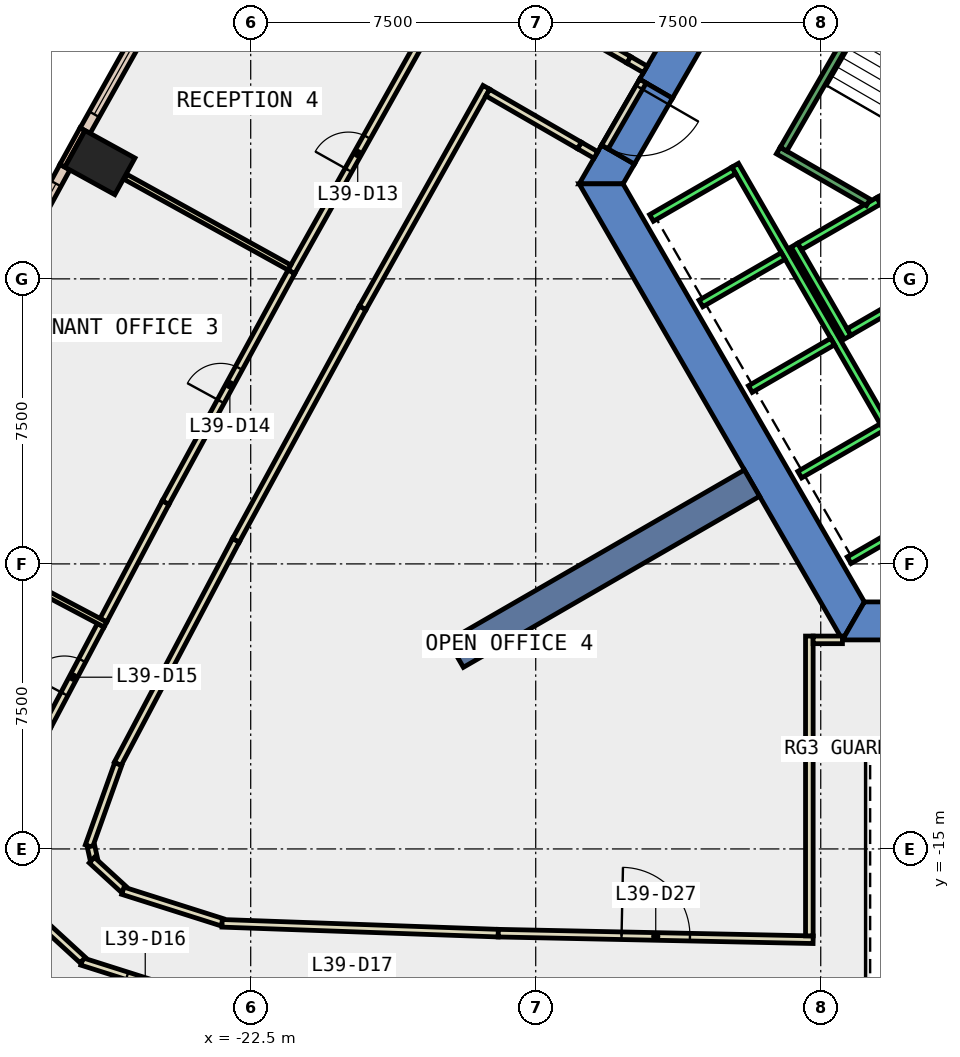
"""IFC4 building model, lengths in metres.
Left out: names, types, materials, properties, quantities, classifications, styles, units other than length and angle.
Written with IfcOpenShell. Run it as: python <this file> out.ifc"""

import sys

from ifc_helpers import new_model, si_unit, direction, frame, frame_2d, origin, origin_2d, place, context, subcontext, project, spatial, polyline, rectangle, outline, extrude, element, fill, save


model = new_model("IFC4")
c1 = context("Model", 3, precision=1e-05, world=origin(), true_north=direction((0.0, 1.0)))
c2 = subcontext(c1, "Body", "Model", "MODEL_VIEW")
j1 = project(units=[si_unit("LENGTHUNIT", "METRE"), si_unit("PLANEANGLEUNIT", "RADIAN")], contexts=[c1])
p1 = place(None, origin())
s1 = spatial("IfcSite", under=j1, at=p1, CompositionType="ELEMENT")
p2 = place(p1, origin())
s2 = spatial("IfcBuilding", under=s1, at=p2, CompositionType="ELEMENT")
p3 = place(p2, frame((0.0, 0.0, 176.0)))
s3 = spatial("IfcBuildingStorey", under=s2, at=p3, CompositionType="ELEMENT", Elevation=176.0)
p4 = place(p3, frame((-26.468, 3.059, -0.4), z_axis=(0.0, 0.0, 1.0), x_axis=(0.481983074142, 0.876180527198, 0.0)))
e1 = element("IfcColumn", 1, at=p4, inside=s3, PredefinedType="COLUMN", context=c2, shape_type="SweptSolid", body=[
    extrude(rectangle(XDim=1.1, YDim=1.5, at=origin_2d()), origin(), (0.0, 0.0, 1.0), 4.2),
])
p5 = place(p3, frame((0.0, 0.0, -0.4)))
e2 = element("IfcWall", 2, at=p5, inside=s3, PredefinedType="SHEAR", context=c2, shape_type="SweptSolid", body=[
    extrude(outline(polyline([(-12.267, 5.252), (-11.402, 4.752), (-6.351, 13.5), (-6.928, 14.5), (-12.267, 5.252)])), origin(), (0.0, 0.0, 1.0), 4.2),
])
p6 = place(p3, frame((0.0, 0.0, -0.4)))
e3 = element("IfcWall", 3, at=p6, inside=s3, PredefinedType="SHEAR", context=c2, shape_type="SweptSolid", body=[
    extrude(outline(polyline([(-12.402, 3.02), (-13.267, 3.52), (-13.856, 2.5), (-12.702, 2.5), (-12.402, 3.02)])), origin(), (0.0, 0.0, 1.0), 4.2),
])
p7 = place(p3, frame((0.0, 0.0, 3.6)))
e4 = element("IfcWall", 4, at=p7, inside=s3, PredefinedType="SHEAR", context=c2, shape_type="SweptSolid", body=[
    extrude(outline(polyline([(-13.267, 3.52), (-12.402, 3.02), (-11.402, 4.752), (-12.267, 5.252), (-13.267, 3.52)])), origin(), (0.0, 0.0, 1.0), 0.2),
])
p8 = place(p3, frame((0.0, 0.0, -0.4)))
e5 = element("IfcWall", 5, at=p8, inside=s3, PredefinedType="SHEAR", context=c2, shape_type="SweptSolid", body=[
    extrude(outline(polyline([(-13.856, 2.5), (-6.928, -9.5), (-6.351, -8.5), (-12.702, 2.5), (-13.856, 2.5)])), origin(), (0.0, 0.0, 1.0), 4.2),
])
p9 = place(p3, frame((0.0, 0.0, -0.4)))
e6 = element("IfcWall", 6, at=p9, inside=s3, PredefinedType="SHEAR", context=c2, shape_type="SweptSolid", body=[
    extrude(outline(polyline([(3.75, -9.5), (3.75, -8.5), (-6.351, -8.5), (-6.928, -9.5), (3.75, -9.5)])), origin(), (0.0, 0.0, 1.0), 4.2),
])
p10 = place(p3, frame((-9.31, -5.375, -0.4), z_axis=(0.0, 0.0, 1.0), x_axis=(-0.866017533419, -0.500013631625, 0.0)))
e7 = element("IfcWall", 7, at=p10, inside=s3, PredefinedType="SHEAR", context=c2, shape_type="SweptSolid", body=[
    extrude(rectangle(XDim=9.0, YDim=0.8, at=frame_2d((4.5, 0.0))), origin(), (0.0, 0.0, 1.0), 4.2),
])
p11 = place(p3, frame((-26.926, 3.939, 0.0), z_axis=(0.0, 0.0, 1.0), x_axis=(-0.481850587491, -0.876253394478, 0.0)))
e8 = element("IfcWall", 8, at=p11, inside=s3, PredefinedType="STANDARD", context=c2, shape_type="SweptSolid", body=[
    extrude(rectangle(XDim=1.1, YDim=0.15, at=frame_2d((0.55, 0.0))), origin(), (0.0, 0.0, 1.0), 3.8),
])
p12 = place(p3, frame((-23.936, 9.106, 0.0), z_axis=(0.0, 0.0, 1.0), x_axis=(-0.489305602904, -0.872112393541, 0.0)))
e9 = element("IfcWall", 9, at=p12, inside=s3, PredefinedType="STANDARD", context=c2, shape_type="SweptSolid", body=[
    extrude(rectangle(XDim=5.969, YDim=0.3, at=frame_2d((2.985, 0.0))), origin(), (0.0, 0.0, 1.0), 3.8),
])
p13 = place(p12, frame((0.492, 0.0, 0.9)))
e10 = element("IfcOpeningElement", 10, at=p13, cuts=e9, PredefinedType="OPENING", context=c2, shape_type="SweptSolid", body=[
    extrude(rectangle(XDim=2.0, YDim=2.6, at=frame_2d((1.0, 1.3))), frame((0.0, 0.16, 0.0), z_axis=(0.0, -1.0, 0.0), x_axis=(1.0, 0.0, 0.0)), (0.0, 0.0, 1.0), 0.32),
])
p14 = place(p12, frame((3.477, 0.0, 0.9)))
e11 = element("IfcOpeningElement", 11, at=p14, cuts=e9, PredefinedType="OPENING", context=c2, shape_type="SweptSolid", body=[
    extrude(rectangle(XDim=2.0, YDim=2.6, at=frame_2d((1.0, 1.3))), frame((0.0, 0.16, 0.0), z_axis=(0.0, -1.0, 0.0), x_axis=(1.0, 0.0, 0.0)), (0.0, 0.0, 1.0), 0.32),
])
p15 = place(p3, frame((-27.388, 2.939, 0.0), z_axis=(0.0, 0.0, 1.0), x_axis=(-0.478711740571, -0.877972134774, 0.0)))
e12 = element("IfcWall", 12, at=p15, inside=s3, PredefinedType="STANDARD", context=c2, shape_type="SweptSolid", body=[
    extrude(rectangle(XDim=5.97, YDim=0.3, at=frame_2d((2.985, 0.0))), origin(), (0.0, 0.0, 1.0), 3.8),
])
p16 = place(p15, frame((0.493, 0.0, 0.9)))
e13 = element("IfcOpeningElement", 13, at=p16, cuts=e12, PredefinedType="OPENING", context=c2, shape_type="SweptSolid", body=[
    extrude(rectangle(XDim=2.0, YDim=2.6, at=frame_2d((1.0, 1.3))), frame((0.0, 0.16, 0.0), z_axis=(0.0, -1.0, 0.0), x_axis=(1.0, 0.0, 0.0)), (0.0, 0.0, 1.0), 0.32),
])
p17 = place(p15, frame((3.478, 0.0, 0.9)))
e14 = element("IfcOpeningElement", 14, at=p17, cuts=e12, PredefinedType="OPENING", context=c2, shape_type="SweptSolid", body=[
    extrude(rectangle(XDim=2.0, YDim=2.6, at=frame_2d((1.0, 1.3))), frame((0.0, 0.16, 0.0), z_axis=(0.0, -1.0, 0.0), x_axis=(1.0, 0.0, 0.0)), (0.0, 0.0, 1.0), 0.32),
])
p18 = place(p3, frame((-14.966, 7.157, 0.0), z_axis=(0.0, 0.0, 1.0), x_axis=(0.86600487494, -0.500035555316, 0.0)))
e15 = element("IfcWall", 15, at=p18, inside=s3, PredefinedType="PARTITIONING", context=c2, shape_type="SweptSolid", body=[
    extrude(rectangle(XDim=2.79, YDim=0.2, at=frame_2d((1.395, 0.0))), origin(), (0.0, 0.0, 1.0), 3.75),
])
p19 = place(p3, frame((-22.888, -6.878, 0.0), z_axis=(0.0, 0.0, 1.0), x_axis=(-0.467533790284, -0.883975200411, 0.0)))
e16 = element("IfcWall", 16, at=p19, inside=s3, PredefinedType="PARTITIONING", context=c2, shape_type="SweptSolid", body=[
    extrude(rectangle(XDim=6.656, YDim=0.2, at=frame_2d((3.328, 0.0))), origin(), (0.0, 0.0, 1.0), 3.75),
])
p20 = place(p3, frame((-25.987, -12.768, 0.0), z_axis=(0.0, 0.0, 1.0), x_axis=(-0.33645112914, -0.941700927949, 0.0)))
e17 = element("IfcWall", 17, at=p20, inside=s3, PredefinedType="PARTITIONING", context=c2, shape_type="SweptSolid", body=[
    extrude(rectangle(XDim=2.292, YDim=0.2, at=frame_2d((1.146, 0.0))), origin(), (0.0, 0.0, 1.0), 3.75),
])
p21 = place(p3, frame((-26.703, -14.93, 0.0), z_axis=(0.0, 0.0, 1.0), x_axis=(0.216250293589, -0.976337959173, 0.0)))
e18 = element("IfcWall", 18, at=p21, inside=s3, PredefinedType="PARTITIONING", context=c2, shape_type="SweptSolid", body=[
    extrude(rectangle(XDim=0.342, YDim=0.2, at=frame_2d((0.171, 0.0))), origin(), (0.0, 0.0, 1.0), 3.75),
])
p22 = place(p3, frame((-26.681, -15.294, 0.0), z_axis=(0.0, 0.0, 1.0), x_axis=(0.737118519418, -0.675763485497, 0.0)))
e19 = element("IfcWall", 19, at=p22, inside=s3, PredefinedType="PARTITIONING", context=c2, shape_type="SweptSolid", body=[
    extrude(rectangle(XDim=1.138, YDim=0.2, at=frame_2d((0.569, 0.0))), origin(), (0.0, 0.0, 1.0), 3.75),
])
p23 = place(p3, frame((-25.864, -16.1, 0.0), z_axis=(0.0, 0.0, 1.0), x_axis=(0.953158072423, -0.302472625167, 0.0)))
e20 = element("IfcWall", 20, at=p23, inside=s3, PredefinedType="PARTITIONING", context=c2, shape_type="SweptSolid", body=[
    extrude(rectangle(XDim=2.743, YDim=0.2, at=frame_2d((1.372, 0.0))), origin(), (0.0, 0.0, 1.0), 3.75),
])
p24 = place(p3, frame((-23.253, -16.957, 0.0), z_axis=(0.0, 0.0, 1.0), x_axis=(0.999365460355, -0.035618487468, 0.0)))
e21 = element("IfcWall", 21, at=p24, inside=s3, PredefinedType="PARTITIONING", context=c2, shape_type="SweptSolid", body=[
    extrude(rectangle(XDim=7.272, YDim=0.2, at=frame_2d((3.636, 0.0))), origin(), (0.0, 0.0, 1.0), 3.75),
])
p25 = place(p3, frame((-15.985, -17.216, 0.0), z_axis=(0.0, 0.0, 1.0), x_axis=(0.999782442794, -0.020858261713, 0.0)))
e22 = element("IfcWall", 22, at=p25, inside=s3, PredefinedType="PARTITIONING", context=c2, shape_type="SweptSolid", body=[
    extrude(rectangle(XDim=8.287, YDim=0.2, at=frame_2d((4.144, 0.0))), origin(), (0.0, 0.0, 1.0), 3.75),
])
p26 = place(p25, frame((3.244, 0.0, 0.0)))
e23 = element("IfcOpeningElement", 23, at=p26, cuts=e22, PredefinedType="OPENING", context=c2, shape_type="SweptSolid", body=[
    extrude(rectangle(XDim=1.8, YDim=2.1, at=frame_2d((0.9, 1.05))), frame((0.0, 0.11, 0.0), z_axis=(0.0, -1.0, 0.0), x_axis=(1.0, 0.0, 0.0)), (0.0, 0.0, 1.0), 0.22),
])
p27 = place(p3, frame((-13.417, 3.26, 0.0), z_axis=(0.0, 0.0, 1.0), x_axis=(-0.866071776036, 0.499919672301, 0.0)))
e24 = element("IfcWall", 24, at=p27, inside=s3, PredefinedType="PARTITIONING", context=c2, shape_type="SweptSolid", body=[
    extrude(rectangle(XDim=0.5, YDim=0.2, at=frame_2d((0.25, 0.0))), origin(), (0.0, 0.0, 1.0), 2.4),
])
p28 = place(p3, frame((-16.299, 5.04, 0.0), z_axis=(0.0, 0.0, 1.0), x_axis=(-0.489219677344, -0.872160597195, 0.0)))
e25 = element("IfcWall", 25, at=p28, inside=s3, PredefinedType="PARTITIONING", context=c2, shape_type="SweptSolid", body=[
    extrude(rectangle(XDim=6.657, YDim=0.2, at=frame_2d((3.329, 0.0))), origin(), (0.0, 0.0, 1.0), 3.75),
])
p29 = place(p3, frame((-19.556, -0.766, 0.0), z_axis=(0.0, 0.0, 1.0), x_axis=(-0.478665365973, -0.877997418799, 0.0)))
e26 = element("IfcWall", 26, at=p29, inside=s3, PredefinedType="PARTITIONING", context=c2, shape_type="SweptSolid", body=[
    extrude(rectangle(XDim=6.961, YDim=0.2, at=frame_2d((3.48, 0.0))), origin(), (0.0, 0.0, 1.0), 3.75),
])
p30 = place(p3, frame((-21.43, 0.185, 0.0), z_axis=(0.0, 0.0, 1.0), x_axis=(0.489124577711, 0.872213934468, 0.0)))
e27 = element("IfcWall", 27, at=p30, inside=s3, PredefinedType="PARTITIONING", context=c2, shape_type="SweptSolid", body=[
    extrude(rectangle(XDim=6.988, YDim=0.2, at=frame_2d((3.494, 0.0))), origin(), (0.0, 0.0, 1.0), 3.75),
])
p31 = place(p30, frame((3.069, 0.0, 0.0)))
e28 = element("IfcOpeningElement", 28, at=p31, cuts=e27, PredefinedType="OPENING", context=c2, shape_type="SweptSolid", body=[
    extrude(rectangle(XDim=1.0, YDim=2.1, at=frame_2d((0.5, 1.05))), frame((0.0, 0.11, 0.0), z_axis=(0.0, -1.0, 0.0), x_axis=(1.0, 0.0, 0.0)), (0.0, 0.0, 1.0), 0.22),
])
p32 = place(p3, frame((-26.376, -8.982, 0.0), z_axis=(0.0, 0.0, 1.0), x_axis=(0.467529077139, 0.883977693174, 0.0)))
e29 = element("IfcWall", 29, at=p32, inside=s3, PredefinedType="PARTITIONING", context=c2, shape_type="SweptSolid", body=[
    extrude(rectangle(XDim=3.503, YDim=0.2, at=frame_2d((1.752, 0.0))), origin(), (0.0, 0.0, 1.0), 3.75),
])
p33 = place(p3, frame((-24.738, -5.885, 0.0), z_axis=(0.0, 0.0, 1.0), x_axis=(0.478535377863, 0.878068273048, 0.0)))
e30 = element("IfcWall", 30, at=p33, inside=s3, PredefinedType="PARTITIONING", context=c2, shape_type="SweptSolid", body=[
    extrude(rectangle(XDim=6.913, YDim=0.2, at=frame_2d((3.457, 0.0))), origin(), (0.0, 0.0, 1.0), 3.75),
])
p34 = place(p33, frame((3.031, 0.0, 0.0)))
e31 = element("IfcOpeningElement", 31, at=p34, cuts=e30, PredefinedType="OPENING", context=c2, shape_type="SweptSolid", body=[
    extrude(rectangle(XDim=1.0, YDim=2.1, at=frame_2d((0.5, 1.05))), frame((0.0, 0.11, 0.0), z_axis=(0.0, -1.0, 0.0), x_axis=(1.0, 0.0, 0.0)), (0.0, 0.0, 1.0), 0.22),
])
p35 = place(p3, frame((-27.891, -11.847, 0.0), z_axis=(0.0, 0.0, 1.0), x_axis=(0.467571923705, 0.883955030623, 0.0)))
e32 = element("IfcWall", 32, at=p35, inside=s3, PredefinedType="PARTITIONING", context=c2, shape_type="SweptSolid", body=[
    extrude(rectangle(XDim=3.091, YDim=0.2, at=frame_2d((1.545, 0.0))), origin(), (0.0, 0.0, 1.0), 3.75),
])
p36 = place(p35, frame((1.045, 0.0, 0.0)))
e33 = element("IfcOpeningElement", 33, at=p36, cuts=e32, PredefinedType="OPENING", context=c2, shape_type="SweptSolid", body=[
    extrude(rectangle(XDim=1.0, YDim=2.1, at=frame_2d((0.5, 1.05))), frame((0.0, 0.11, 0.0), z_axis=(0.0, -1.0, 0.0), x_axis=(1.0, 0.0, 0.0)), (0.0, 0.0, 1.0), 0.22),
])
p37 = place(p3, frame((-23.61, -19.019, 0.0), z_axis=(0.0, 0.0, 1.0), x_axis=(-0.953121068097, 0.302589209243, 0.0)))
e34 = element("IfcWall", 34, at=p37, inside=s3, PredefinedType="PARTITIONING", context=c2, shape_type="SweptSolid", body=[
    extrude(rectangle(XDim=3.494, YDim=0.2, at=frame_2d((1.747, 0.0))), origin(), (0.0, 0.0, 1.0), 3.75),
])
p38 = place(p37, frame((1.247, 0.0, 0.0)))
e35 = element("IfcOpeningElement", 35, at=p38, cuts=e34, PredefinedType="OPENING", context=c2, shape_type="SweptSolid", body=[
    extrude(rectangle(XDim=1.0, YDim=2.1, at=frame_2d((0.5, 1.05))), frame((0.0, 0.11, 0.0), z_axis=(0.0, -1.0, 0.0), x_axis=(1.0, 0.0, 0.0)), (0.0, 0.0, 1.0), 0.22),
])
p39 = place(p3, frame((-26.919, -17.925, 0.0), z_axis=(0.0, 0.0, 1.0), x_axis=(-0.737118331834, 0.675763690112, 0.0)))
e36 = element("IfcWall", 36, at=p39, inside=s3, PredefinedType="PARTITIONING", context=c2, shape_type="SweptSolid", body=[
    extrude(rectangle(XDim=2.264, YDim=0.2, at=frame_2d((1.132, 0.0))), origin(), (0.0, 0.0, 1.0), 3.75),
])
p40 = place(p3, frame((-7.8, -17.287, 0.0), z_axis=(0.0, 0.0, 1.0), x_axis=(0.0, 1.0, 0.0)))
e37 = element("IfcWall", 37, at=p40, inside=s3, PredefinedType="PARTITIONING", context=c2, shape_type="SweptSolid", body=[
    extrude(rectangle(XDim=7.888, YDim=0.2, at=frame_2d((3.944, 0.0))), origin(), (0.0, 0.0, 1.0), 3.75),
])
p41 = place(p3, frame((-7.7, -9.499, 0.0), z_axis=(0.0, 0.0, 1.0), x_axis=(1.0, 0.0, 0.0)))
e38 = element("IfcWall", 38, at=p41, inside=s3, PredefinedType="PARTITIONING", context=c2, shape_type="SweptSolid", body=[
    extrude(rectangle(XDim=0.771, YDim=0.2, at=frame_2d((0.385, 0.0))), origin(), (0.0, 0.0, 1.0), 3.75),
])
p42 = place(p3, frame((-21.481, 0.299, 0.0), z_axis=(0.0, 0.0, 1.0), x_axis=(-0.875073760972, 0.483989579286, 0.0)))
e39 = element("IfcWall", 39, at=p42, inside=s3, PredefinedType="PARTITIONING", context=c2, shape_type="SweptSolid", body=[
    extrude(rectangle(XDim=4.93, YDim=0.15, at=frame_2d((2.465, 0.0))), origin(), (0.0, 0.0, 1.0), 3.75),
])
p43 = place(p3, frame((-26.323, -9.095, 0.0), z_axis=(0.0, 0.0, 1.0), x_axis=(-0.883977869384, 0.467528743971, 0.0)))
e40 = element("IfcWall", 40, at=p43, inside=s3, PredefinedType="PARTITIONING", context=c2, shape_type="SweptSolid", body=[
    extrude(rectangle(XDim=6.5, YDim=0.15, at=frame_2d((3.25, 0.0))), origin(), (0.0, 0.0, 1.0), 3.75),
])
p44 = place(p3, frame((-12.18, 5.202, 0.0), z_axis=(0.0, 0.0, 1.0), x_axis=(-0.50002537861, -0.866010750942, 0.0)))
e41 = element("IfcWall", 41, at=p44, inside=s3, PredefinedType="PARTITIONING", context=c2, shape_type="SweptSolid", body=[
    extrude(rectangle(XDim=2.0, YDim=0.2, at=frame_2d((1.0, 0.0))), origin(), (0.0, 0.0, 1.0), 2.4),
])
p45 = place(p44, frame((0.19, 0.0, 0.0)))
e42 = element("IfcOpeningElement", 42, at=p45, cuts=e41, PredefinedType="OPENING", context=c2, shape_type="SweptSolid", body=[
    extrude(rectangle(XDim=1.8, YDim=2.1, at=frame_2d((0.9, 1.05))), frame((0.0, 0.11, 0.0), z_axis=(0.0, -1.0, 0.0), x_axis=(1.0, 0.0, 0.0)), (0.0, 0.0, 1.0), 0.22),
])
p46 = place(p3, frame((-12.55, 5.762, 0.0), z_axis=(0.0, 0.0, 1.0), x_axis=(0.866071776036, -0.499919672301, 0.0)))
e43 = element("IfcWall", 43, at=p46, inside=s3, PredefinedType="PARTITIONING", context=c2, shape_type="SweptSolid", body=[
    extrude(rectangle(XDim=0.5, YDim=0.2, at=frame_2d((0.25, 0.0))), origin(), (0.0, 0.0, 1.0), 2.4),
])
p47 = place(p3, frame((-13.85, 3.51, 0.0), z_axis=(0.0, 0.0, 1.0), x_axis=(-0.866087780421, 0.49989194493, 0.0)))
e44 = element("IfcWall", 44, at=p47, inside=s3, PredefinedType="PARTITIONING", context=c2, shape_type="SweptSolid", body=[
    extrude(rectangle(XDim=2.785, YDim=0.2, at=frame_2d((1.392, 0.0))), origin(), (0.0, 0.0, 1.0), 3.75),
])
p48 = place(p3, frame((-5.94, 2.188, 0.0), z_axis=(0.0, 0.0, 1.0), x_axis=(0.49994636267, -0.866056369097, 0.0)))
e45 = element("IfcWall", 45, at=p48, inside=s3, PredefinedType="STANDARD", context=c2, shape_type="SweptSolid", body=[
    extrude(rectangle(XDim=2.8, YDim=0.2, at=frame_2d((1.4, 0.0))), origin(), (0.0, 0.0, 1.0), 3.75),
])
p49 = place(p48, frame((1.225, 0.0, 0.0)))
e46 = element("IfcOpeningElement", 46, at=p49, cuts=e45, PredefinedType="OPENING", context=c2, shape_type="SweptSolid", body=[
    extrude(rectangle(XDim=1.1, YDim=2.1, at=frame_2d((0.55, 1.05))), frame((0.0, 0.11, 0.0), z_axis=(0.0, -1.0, 0.0), x_axis=(1.0, 0.0, 0.0)), (0.0, 0.0, 1.0), 0.22),
])
p50 = place(p3, frame((-8.192, 0.888, 0.0), z_axis=(0.0, 0.0, 1.0), x_axis=(0.49994636267, -0.866056369097, 0.0)))
e47 = element("IfcWall", 47, at=p50, inside=s3, PredefinedType="STANDARD", context=c2, shape_type="SweptSolid", body=[
    extrude(rectangle(XDim=2.8, YDim=0.2, at=frame_2d((1.4, 0.0))), origin(), (0.0, 0.0, 1.0), 3.75),
])
for number, where, z_axis, x_axis in (
    (48, (-5.977, 2.052, 0.0), (0.0, 0.0, 1.0), (-0.866, -0.5, 0.0)),
    (49, (-4.677, -0.2, 0.0), (0.0, 0.0, 1.0), (-0.866, -0.5, 0.0)),
):
    element("IfcWall", number, at=place(p3, frame(where, z_axis=z_axis, x_axis=x_axis)), inside=s3, PredefinedType="STANDARD", context=c2, shape_type="SweptSolid", body=[
        extrude(rectangle(XDim=2.399, YDim=0.2, at=frame_2d((1.2, 0.0))), origin(), (0.0, 0.0, 1.0), 3.75),
    ])
p51 = place(p3, frame((-9.751, 2.99, 0.0), z_axis=(0.0, 0.0, 1.0), x_axis=(0.50000090737, -0.866024879913, 0.0)))
e50 = element("IfcWall", 50, at=p51, inside=s3, PredefinedType="STANDARD", context=c2, shape_type="SweptSolid", body=[
    extrude(rectangle(XDim=10.6, YDim=0.2, at=frame_2d((5.3, 0.0))), origin(), (0.0, 0.0, 1.0), 3.75),
])
p52 = place(p3, frame((-9.788, 2.853, 0.0), z_axis=(0.0, 0.0, 1.0), x_axis=(-0.865998541277, -0.500046524342, 0.0)))
e51 = element("IfcWall", 51, at=p52, inside=s3, PredefinedType="STANDARD", context=c2, shape_type="SweptSolid", body=[
    extrude(rectangle(XDim=2.5, YDim=0.2, at=frame_2d((1.25, 0.0))), origin(), (0.0, 0.0, 1.0), 3.75),
])
for number, where, z_axis, x_axis in (
    (52, (-8.488, 0.602, 0.0), (0.0, 0.0, 1.0), (-0.866, -0.5, 0.0)),
    (53, (-7.188, -1.65, 0.0), (0.0, 0.0, 1.0), (-0.866, -0.5, 0.0)),
    (54, (-5.888, -3.902, 0.0), (0.0, 0.0, 1.0), (-0.866, -0.5, 0.0)),
    (55, (-4.588, -6.153, 0.0), (0.0, 0.0, 1.0), (-0.866, -0.5, 0.0)),
):
    element("IfcWall", number, at=place(p3, frame(where, z_axis=z_axis, x_axis=x_axis)), inside=s3, PredefinedType="STANDARD", context=c2, shape_type="SweptSolid", body=[
        extrude(rectangle(XDim=2.5, YDim=0.2, at=frame_2d((1.25, 0.0))), origin(), (0.0, 0.0, 1.0), 3.75),
    ])
p53 = place(p3, frame((-6.25, 2.01, 0.0), z_axis=(0.0, 0.0, 1.0), x_axis=(-0.86611865017, 0.499838457731, 0.0)))
e56 = element("IfcWall", 56, at=p53, inside=s3, PredefinedType="STANDARD", context=c2, shape_type="SweptSolid", body=[
    extrude(rectangle(XDim=2.733, YDim=0.2, at=frame_2d((1.366, 0.0))), origin(), (0.0, 0.0, 1.0), 3.75),
])
p54 = place(p3, frame((-5.03, 9.388, 0.0), z_axis=(0.0, 0.0, 1.0), x_axis=(-0.499978703459, -0.866037698999, 0.0)))
e57 = element("IfcWall", 57, at=p54, inside=s3, PredefinedType="STANDARD", context=c2, shape_type="SweptSolid", body=[
    extrude(rectangle(XDim=6.9, YDim=0.2, at=frame_2d((3.45, 0.0))), origin(), (0.0, 0.0, 1.0), 3.75),
])
p55 = place(p14, origin())
e58 = element("IfcWindow", 58, at=p55, inside=s3, PartitioningType="SINGLE_PANEL", PredefinedType="WINDOW", context=c2, shape_type="SweptSolid", body=[
    extrude(rectangle(XDim=2.0, YDim=2.6, at=frame_2d((1.0, 1.3))), frame((0.0, 0.03, 0.0), z_axis=(0.0, -1.0, 0.0), x_axis=(1.0, 0.0, 0.0)), (0.0, 0.0, 1.0), 0.06),
])
fill(e11, e58)
p56 = place(p16, origin())
e59 = element("IfcWindow", 59, at=p56, inside=s3, PartitioningType="SINGLE_PANEL", PredefinedType="WINDOW", context=c2, shape_type="SweptSolid", body=[
    extrude(rectangle(XDim=2.0, YDim=2.6, at=frame_2d((1.0, 1.3))), frame((0.0, 0.03, 0.0), z_axis=(0.0, -1.0, 0.0), x_axis=(1.0, 0.0, 0.0)), (0.0, 0.0, 1.0), 0.06),
])
fill(e13, e59)
p57 = place(p31, origin())
e60 = element("IfcDoor", 60, at=p57, inside=s3, OperationType="SINGLE_SWING_LEFT", PredefinedType="DOOR", context=c2, shape_type="SweptSolid", body=[
    extrude(rectangle(XDim=1.0, YDim=2.1, at=frame_2d((0.5, 1.05))), frame((0.0, 0.025, 0.0), z_axis=(0.0, -1.0, 0.0), x_axis=(1.0, 0.0, 0.0)), (0.0, 0.0, 1.0), 0.05),
])
fill(e28, e60)
p58 = place(p34, origin())
e61 = element("IfcDoor", 61, at=p58, inside=s3, OperationType="SINGLE_SWING_RIGHT", PredefinedType="DOOR", context=c2, shape_type="SweptSolid", body=[
    extrude(rectangle(XDim=1.0, YDim=2.1, at=frame_2d((0.5, 1.05))), frame((0.0, 0.025, 0.0), z_axis=(0.0, -1.0, 0.0), x_axis=(1.0, 0.0, 0.0)), (0.0, 0.0, 1.0), 0.05),
])
fill(e31, e61)
p59 = place(p36, origin())
e62 = element("IfcDoor", 62, at=p59, inside=s3, OperationType="SINGLE_SWING_LEFT", PredefinedType="DOOR", context=c2, shape_type="SweptSolid", body=[
    extrude(rectangle(XDim=1.0, YDim=2.1, at=frame_2d((0.5, 1.05))), frame((0.0, 0.025, 0.0), z_axis=(0.0, -1.0, 0.0), x_axis=(1.0, 0.0, 0.0)), (0.0, 0.0, 1.0), 0.05),
])
fill(e33, e62)
p60 = place(p38, origin())
e63 = element("IfcDoor", 63, at=p60, inside=s3, OperationType="SINGLE_SWING_LEFT", PredefinedType="DOOR", context=c2, shape_type="SweptSolid", body=[
    extrude(rectangle(XDim=1.0, YDim=2.1, at=frame_2d((0.5, 1.05))), frame((0.0, 0.025, 0.0), z_axis=(0.0, -1.0, 0.0), x_axis=(1.0, 0.0, 0.0)), (0.0, 0.0, 1.0), 0.05),
])
fill(e35, e63)
p61 = place(p26, origin())
e64 = element("IfcDoor", 64, at=p61, inside=s3, OperationType="DOUBLE_DOOR_SINGLE_SWING", PredefinedType="DOOR", context=c2, shape_type="SweptSolid", body=[
    extrude(rectangle(XDim=1.8, YDim=2.1, at=frame_2d((0.9, 1.05))), frame((0.0, 0.025, 0.0), z_axis=(0.0, -1.0, 0.0), x_axis=(1.0, 0.0, 0.0)), (0.0, 0.0, 1.0), 0.05),
])
fill(e23, e64)
p62 = place(p45, origin())
e65 = element("IfcDoor", 65, at=p62, inside=s3, OperationType="DOUBLE_DOOR_SINGLE_SWING", PredefinedType="DOOR", context=c2, shape_type="SweptSolid", body=[
    extrude(rectangle(XDim=1.8, YDim=2.1, at=frame_2d((0.9, 1.05))), frame((0.0, 0.025, 0.0), z_axis=(0.0, -1.0, 0.0), x_axis=(1.0, 0.0, 0.0)), (0.0, 0.0, 1.0), 0.05),
])
fill(e42, e65)
save(model, sys.argv[1])
